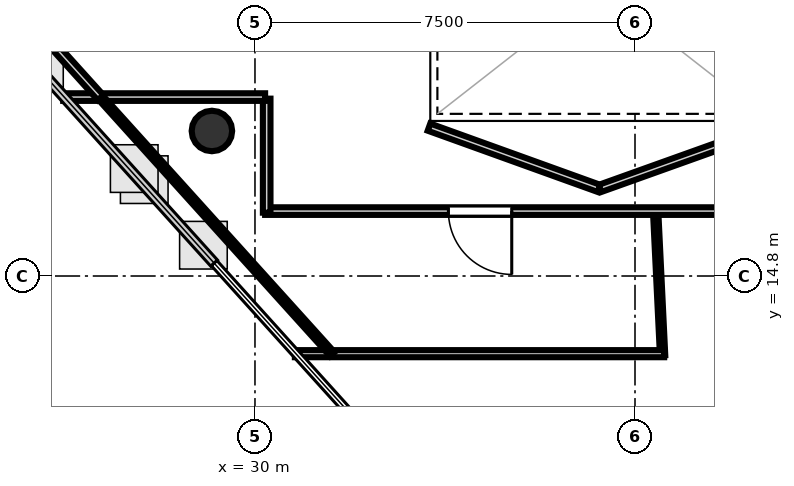
"""IFC4 building model, lengths in metres.
Left out: names, types, materials, properties, quantities, classifications, styles, units other than length and angle.
Written with IfcOpenShell. Run it as: python <this file> out.ifc"""

import sys

from ifc_helpers import new_model, si_unit, direction, frame, frame_2d, origin, origin_2d, place, context, subcontext, project, spatial, rectangle, hollow_circle, extrude, element, fill, save


model = new_model("IFC4")
c1 = context("Model", 3, precision=1e-05, world=origin(), true_north=direction((0.0, 1.0)))
c2 = subcontext(c1, "Body", "Model", "MODEL_VIEW")
j1 = project(units=[si_unit("LENGTHUNIT", "METRE"), si_unit("PLANEANGLEUNIT", "RADIAN")], contexts=[c1])
p1 = place(None, origin())
s1 = spatial("IfcSite", under=j1, at=p1, CompositionType="ELEMENT")
p2 = place(p1, origin())
s2 = spatial("IfcBuilding", under=s1, at=p2, CompositionType="ELEMENT")
p3 = place(p2, frame((0.0, 0.0, 329.6)))
s3 = spatial("IfcBuildingStorey", under=s2, at=p3, CompositionType="ELEMENT", Elevation=329.6)
p4 = place(p3, frame((29.15, 17.662, 0.0), z_axis=(0.0, 0.0, 1.0), x_axis=(1.0, 0.0, 0.0)))
e1 = element("IfcColumn", 1, at=p4, inside=s3, PredefinedType="COLUMN", context=c2, shape_type="SweptSolid", body=[
    extrude(hollow_circle(Radius=0.4, WallThickness=0.022, at=origin_2d()), origin(), (0.0, 0.0, 1.0), 3.7),
])
p5 = place(p3, frame((33.434, 17.738, 0.0), z_axis=(0.0, 0.0, 1.0), x_axis=(0.940782662834, -0.339010296764, 0.0)))
e2 = element("IfcWall", 2, at=p5, inside=s3, PredefinedType="PARTITIONING", context=c2, shape_type="SweptSolid", body=[
    extrude(rectangle(XDim=3.567, YDim=0.15, at=frame_2d((1.783, 0.0))), origin(), (0.0, 0.0, 1.0), 2.84),
])
p6 = place(p3, frame((36.81, 16.529, 0.0), z_axis=(0.0, 0.0, 1.0), x_axis=(0.941548344365, 0.33687789364, 0.0)))
e3 = element("IfcWall", 3, at=p6, inside=s3, PredefinedType="PARTITIONING", context=c2, shape_type="SweptSolid", body=[
    extrude(rectangle(XDim=3.513, YDim=0.15, at=frame_2d((1.756, 0.0))), origin(), (0.0, 0.0, 1.0), 2.84),
])
p7 = place(p3, frame((42.65, 16.081, 0.0), z_axis=(0.0, 0.0, 1.0), x_axis=(-1.0, 0.0, 0.0)))
e4 = element("IfcWall", 4, at=p7, inside=s3, PredefinedType="PARTITIONING", context=c2, shape_type="SweptSolid", body=[
    extrude(rectangle(XDim=12.45, YDim=0.15, at=frame_2d((6.225, 0.0))), origin(), (0.0, 0.0, 1.0), 2.84),
])
p8 = place(p7, frame((7.583, 0.0, 0.0)))
e5 = element("IfcOpeningElement", 5, at=p8, cuts=e4, PredefinedType="OPENING", context=c2, shape_type="SweptSolid", body=[
    extrude(rectangle(XDim=1.25, YDim=2.2, at=frame_2d((0.625, 1.1))), frame((0.0, 0.085, 0.0), z_axis=(0.0, -1.0, 0.0), x_axis=(1.0, 0.0, 0.0)), (0.0, 0.0, 1.0), 0.17),
])
p9 = place(p3, frame((30.231, 16.05, 0.0), z_axis=(0.0, 0.0, 1.0), x_axis=(0.0, 1.0, 0.0)))
e6 = element("IfcWall", 6, at=p9, inside=s3, PredefinedType="PARTITIONING", context=c2, shape_type="SweptSolid", body=[
    extrude(rectangle(XDim=2.25, YDim=0.15, at=frame_2d((1.125, 0.0))), origin(), (0.0, 0.0, 1.0), 2.84),
])
p10 = place(p3, frame((30.2, 18.331, 0.0), z_axis=(0.0, 0.0, 1.0), x_axis=(-1.0, 0.0, 0.0)))
e7 = element("IfcWall", 7, at=p10, inside=s3, PredefinedType="PARTITIONING", context=c2, shape_type="SweptSolid", body=[
    extrude(rectangle(XDim=3.985, YDim=0.15, at=frame_2d((1.992, 0.0))), origin(), (0.0, 0.0, 1.0), 2.84),
])
p11 = place(p3, frame((26.953, 18.321, 0.0), z_axis=(0.0, 0.0, 1.0), x_axis=(-0.670143193307, 0.742231837409, 0.0)))
e8 = element("IfcWall", 8, at=p11, inside=s3, PredefinedType="PARTITIONING", context=c2, shape_type="SweptSolid", body=[
    extrude(rectangle(XDim=1.91, YDim=0.15, at=frame_2d((0.955, 0.0))), origin(), (0.0, 0.0, 1.0), 2.84),
])
p12 = place(p3, frame((37.912, 15.969, 0.0), z_axis=(0.0, 0.0, 1.0), x_axis=(0.048344904465, -0.998830701477, 0.0)))
e9 = element("IfcWall", 9, at=p12, inside=s3, PredefinedType="PARTITIONING", context=c2, shape_type="SweptSolid", body=[
    extrude(rectangle(XDim=2.737, YDim=0.105, at=frame_2d((1.369, 0.0))), origin(), (0.0, 0.0, 1.0), 2.84),
])
p13 = place(p3, frame((38.076, 13.267, 0.0), z_axis=(0.0, 0.0, 1.0), x_axis=(-1.0, 0.0, 0.0)))
e10 = element("IfcWall", 10, at=p13, inside=s3, PredefinedType="PARTITIONING", context=c2, shape_type="SweptSolid", body=[
    extrude(rectangle(XDim=7.288, YDim=0.14, at=frame_2d((3.644, 0.0))), origin(), (0.0, 0.0, 1.0), 2.84),
])
p14 = place(p3, frame((31.525, 13.257, 0.0), z_axis=(0.0, 0.0, 1.0), x_axis=(-0.67017515135, 0.742202982016, 0.0)))
e11 = element("IfcWall", 11, at=p14, inside=s3, PredefinedType="PARTITIONING", context=c2, shape_type="SweptSolid", body=[
    extrude(rectangle(XDim=6.715, YDim=0.12, at=frame_2d((3.357, 0.0))), origin(), (0.0, 0.0, 1.0), 2.84),
])
p15 = place(p8, origin())
e12 = element("IfcDoor", 12, at=p15, inside=s3, OperationType="SINGLE_SWING_LEFT", PredefinedType="DOOR", context=c2, shape_type="SweptSolid", body=[
    extrude(rectangle(XDim=1.25, YDim=2.2, at=frame_2d((0.625, 1.1))), frame((0.0, 0.025, 0.0), z_axis=(0.0, -1.0, 0.0), x_axis=(1.0, 0.0, 0.0)), (0.0, 0.0, 1.0), 0.05),
])
fill(e5, e12)
save(model, sys.argv[1])
